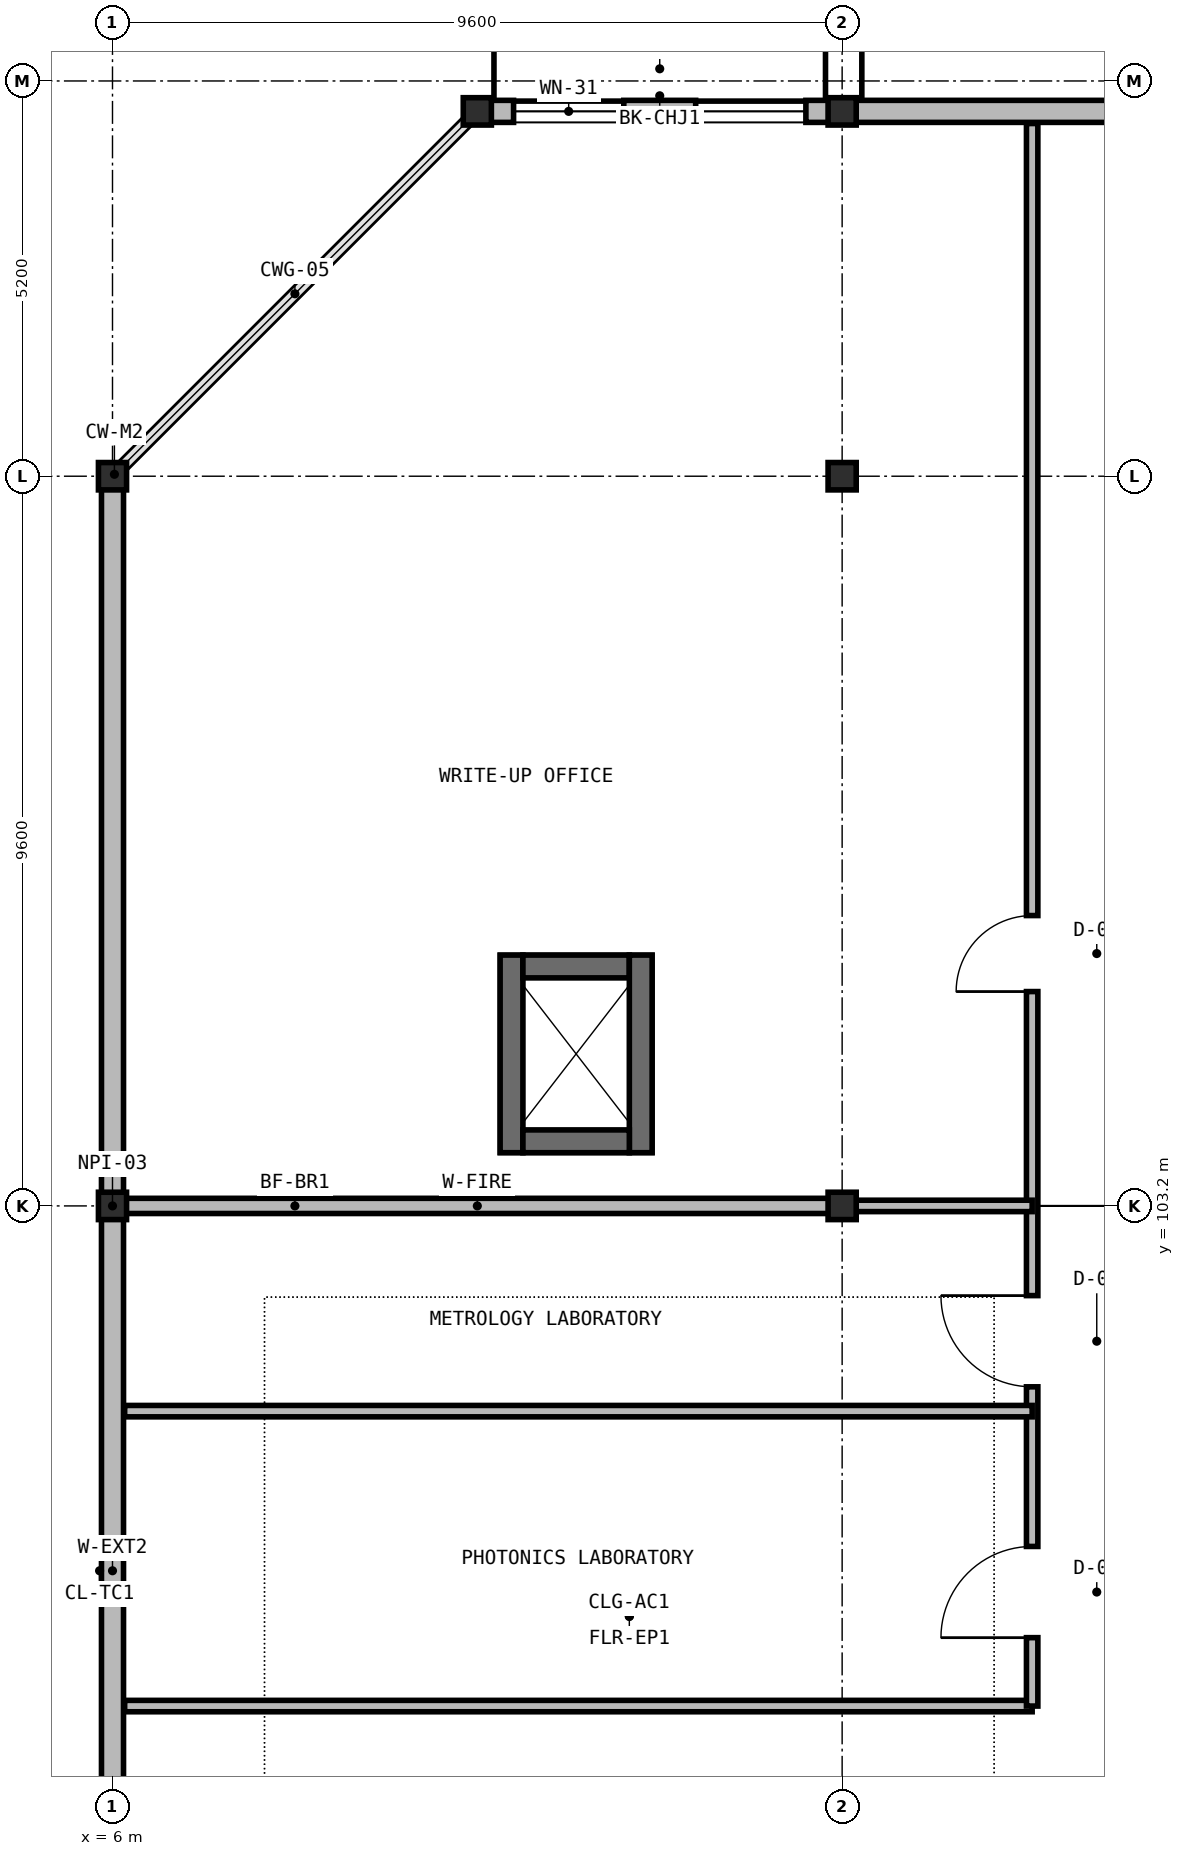
"""IFC4 building model, lengths in metres.
Left out: names, types, materials, properties, quantities, classifications, styles, units other than length and angle.
Written with IfcOpenShell. Run it as: python <this file> out.ifc"""

import sys

from ifc_helpers import new_model, si_unit, direction, frame, frame_2d, origin, origin_2d, place, context, subcontext, project, spatial, rectangle, i_section, extrude, element, fill, save


model = new_model("IFC4")
c1 = context("Model", 3, precision=1e-05, world=origin(), true_north=direction((0.0, 1.0)))
c2 = subcontext(c1, "Body", "Model", "MODEL_VIEW")
j1 = project(units=[si_unit("LENGTHUNIT", "METRE"), si_unit("PLANEANGLEUNIT", "RADIAN")], contexts=[c1])
p1 = place(None, origin())
s1 = spatial("IfcSite", under=j1, at=p1, CompositionType="ELEMENT")
p2 = place(p1, origin())
s2 = spatial("IfcBuilding", under=s1, at=p2, CompositionType="ELEMENT")
p3 = place(p2, frame((0.0, 0.0, 14.35)))
s3 = spatial("IfcBuildingStorey", under=s2, at=p3, CompositionType="ELEMENT", Elevation=14.35)
for number, where, z_axis, x_axis in (
    (1, (6.0, 103.2, 0.0), (0.0, 0.0, 1.0), (1.0, 0.0, 0.0)),
    (2, (6.0, 112.8, 0.0), (0.0, 0.0, 1.0), (1.0, 0.0, 0.0)),
    (3, (15.6, 103.2, 0.0), (0.0, 0.0, 1.0), (1.0, 0.0, 0.0)),
    (4, (15.6, 112.8, 0.0), (0.0, 0.0, 1.0), (1.0, 0.0, 0.0)),
    (5, (15.6, 117.6, 0.0), (0.0, 0.0, 1.0), (1.0, 0.0, 0.0)),
    (6, (10.8, 117.6, 0.0), (0.0, 0.0, 1.0), (1.0, 0.0, 0.0)),
):
    element("IfcColumn", number, at=place(p3, frame(where, z_axis=z_axis, x_axis=x_axis)), inside=s3, PredefinedType="COLUMN", context=c2, shape_type="SweptSolid", body=[
        extrude(i_section(OverallWidth=0.37, OverallDepth=0.36, WebThickness=0.014, FlangeThickness=0.022, at=origin_2d()), origin(), (0.0, 0.0, 1.0), 4.55),
    ])
p4 = place(p3, frame((11.25, 103.9, 0.0), z_axis=(0.0, 0.0, 1.0), x_axis=(0.0, 1.0, 0.0)))
e7 = element("IfcWall", 7, at=p4, inside=s3, PredefinedType="SHEAR", context=c2, shape_type="SweptSolid", body=[
    extrude(rectangle(XDim=2.6, YDim=0.3, at=frame_2d((1.3, 0.0))), origin(), (0.0, 0.0, 1.0), 4.37),
])
p5 = place(p3, frame((11.4, 106.35, 0.0), z_axis=(0.0, 0.0, 1.0), x_axis=(1.0, 0.0, 0.0)))
e8 = element("IfcWall", 8, at=p5, inside=s3, PredefinedType="SHEAR", context=c2, shape_type="SweptSolid", body=[
    extrude(rectangle(XDim=1.4, YDim=0.3, at=frame_2d((0.7, 0.0))), origin(), (0.0, 0.0, 1.0), 4.37),
])
p6 = place(p3, frame((12.95, 106.5, 0.0), z_axis=(0.0, 0.0, 1.0), x_axis=(0.0, -1.0, 0.0)))
e9 = element("IfcWall", 9, at=p6, inside=s3, PredefinedType="SHEAR", context=c2, shape_type="SweptSolid", body=[
    extrude(rectangle(XDim=2.6, YDim=0.3, at=frame_2d((1.3, 0.0))), origin(), (0.0, 0.0, 1.0), 4.37),
])
p7 = place(p3, frame((12.8, 104.05, 0.0), z_axis=(0.0, 0.0, 1.0), x_axis=(-1.0, 0.0, 0.0)))
e10 = element("IfcWall", 10, at=p7, inside=s3, PredefinedType="SHEAR", context=c2, shape_type="SweptSolid", body=[
    extrude(rectangle(XDim=1.4, YDim=0.3, at=frame_2d((0.7, 0.0))), origin(), (0.0, 0.0, 1.0), 4.37),
])
p8 = place(p3, frame((6.0, 93.604, 0.0), z_axis=(0.0, 0.0, 1.0), x_axis=(0.0, 1.0, 0.0)))
e11 = element("IfcWall", 11, at=p8, inside=s3, PredefinedType="SOLIDWALL", context=c2, shape_type="SweptSolid", body=[
    extrude(rectangle(XDim=9.592, YDim=0.29, at=frame_2d((4.796, 0.0))), origin(), (0.0, 0.0, 1.0), 3.884),
])
p9 = place(p3, frame((6.0, 103.204, 0.0), z_axis=(0.0, 0.0, 1.0), x_axis=(0.0, 1.0, 0.0)))
e12 = element("IfcWall", 12, at=p9, inside=s3, PredefinedType="SOLIDWALL", context=c2, shape_type="SweptSolid", body=[
    extrude(rectangle(XDim=9.592, YDim=0.29, at=frame_2d((4.796, 0.0))), origin(), (0.0, 0.0, 1.0), 3.884),
])
p10 = place(p3, frame((10.804, 117.6, 0.0), z_axis=(0.0, 0.0, 1.0), x_axis=(1.0, 0.0, 0.0)))
e13 = element("IfcWall", 13, at=p10, inside=s3, PredefinedType="SOLIDWALL", context=c2, shape_type="SweptSolid", body=[
    extrude(rectangle(XDim=4.792, YDim=0.29, at=frame_2d((2.396, 0.0))), origin(), (0.0, 0.0, 1.0), 4.37),
])
p11 = place(p10, frame((0.473, 0.0, 0.95)))
e14 = element("IfcOpeningElement", 14, at=p11, cuts=e13, PredefinedType="OPENING", context=c2, shape_type="SweptSolid", body=[
    extrude(rectangle(XDim=1.45, YDim=1.59, at=frame_2d((0.725, 0.795))), frame((0.0, 0.155, 0.0), z_axis=(0.0, -1.0, 0.0), x_axis=(1.0, 0.0, 0.0)), (0.0, 0.0, 1.0), 0.31),
])
p12 = place(p10, frame((2.869, 0.0, 0.95)))
e15 = element("IfcOpeningElement", 15, at=p12, cuts=e13, PredefinedType="OPENING", context=c2, shape_type="SweptSolid", body=[
    extrude(rectangle(XDim=1.45, YDim=1.59, at=frame_2d((0.725, 0.795))), frame((0.0, 0.155, 0.0), z_axis=(0.0, -1.0, 0.0), x_axis=(1.0, 0.0, 0.0)), (0.0, 0.0, 1.0), 0.31),
])
p13 = place(p3, frame((15.604, 117.6, 0.0), z_axis=(0.0, 0.0, 1.0), x_axis=(1.0, 0.0, 0.0)))
e16 = element("IfcWall", 16, at=p13, inside=s3, PredefinedType="SOLIDWALL", context=c2, shape_type="SweptSolid", body=[
    extrude(rectangle(XDim=9.592, YDim=0.29, at=frame_2d((4.796, 0.0))), origin(), (0.0, 0.0, 1.0), 3.884),
])
p14 = place(p13, frame((6.449, 0.0, 0.95)))
e17 = element("IfcOpeningElement", 17, at=p14, cuts=e16, PredefinedType="OPENING", context=c2, shape_type="SweptSolid", body=[
    extrude(rectangle(XDim=1.49, YDim=1.43, at=frame_2d((0.745, 0.715))), frame((0.0, 0.155, 0.0), z_axis=(0.0, -1.0, 0.0), x_axis=(1.0, 0.0, 0.0)), (0.0, 0.0, 1.0), 0.31),
])
p15 = place(p3, frame((6.16, 103.2, 0.0), z_axis=(0.0, 0.0, 1.0), x_axis=(1.0, 0.0, 0.0)))
e18 = element("IfcWall", 18, at=p15, inside=s3, PredefinedType="SOLIDWALL", context=c2, shape_type="SweptSolid", body=[
    extrude(rectangle(XDim=9.28, YDim=0.2, at=frame_2d((4.64, 0.0))), origin(), (0.0, 0.0, 1.0), 3.815),
])
p16 = place(p3, frame((6.16, 96.62, 0.0), z_axis=(0.0, 0.0, 1.0), x_axis=(1.0, 0.0, 0.0)))
e19 = element("IfcWall", 19, at=p16, inside=s3, PredefinedType="PARTITIONING", context=c2, shape_type="SweptSolid", body=[
    extrude(rectangle(XDim=11.94, YDim=0.15, at=frame_2d((5.97, 0.0))), origin(), (0.0, 0.0, 1.0), 4.3),
])
p17 = place(p3, frame((18.1, 96.62, 0.0), z_axis=(0.0, 0.0, 1.0), x_axis=(0.0, 1.0, 0.0)))
e20 = element("IfcWall", 20, at=p17, inside=s3, PredefinedType="PARTITIONING", context=c2, shape_type="SweptSolid", body=[
    extrude(rectangle(XDim=20.82, YDim=0.15, at=frame_2d((10.41, 0.0))), origin(), (0.0, 0.0, 1.0), 4.3),
])
p18 = place(p17, frame((0.9, 0.0, 0.0)))
e21 = element("IfcOpeningElement", 21, at=p18, cuts=e20, PredefinedType="OPENING", context=c2, shape_type="SweptSolid", body=[
    extrude(rectangle(XDim=1.2, YDim=2.2, at=frame_2d((0.6, 1.1))), frame((0.0, 0.085, 0.0), z_axis=(0.0, -1.0, 0.0), x_axis=(1.0, 0.0, 0.0)), (0.0, 0.0, 1.0), 0.17),
])
p19 = place(p17, frame((4.2, 0.0, 0.0)))
e22 = element("IfcOpeningElement", 22, at=p19, cuts=e20, PredefinedType="OPENING", context=c2, shape_type="SweptSolid", body=[
    extrude(rectangle(XDim=1.2, YDim=2.2, at=frame_2d((0.6, 1.1))), frame((0.0, 0.085, 0.0), z_axis=(0.0, -1.0, 0.0), x_axis=(1.0, 0.0, 0.0)), (0.0, 0.0, 1.0), 0.17),
])
p20 = place(p17, frame((9.4, 0.0, 0.0)))
e23 = element("IfcOpeningElement", 23, at=p20, cuts=e20, PredefinedType="OPENING", context=c2, shape_type="SweptSolid", body=[
    extrude(rectangle(XDim=1.0, YDim=2.2, at=frame_2d((0.5, 1.1))), frame((0.0, 0.085, 0.0), z_axis=(0.0, -1.0, 0.0), x_axis=(1.0, 0.0, 0.0)), (0.0, 0.0, 1.0), 0.17),
])
p21 = place(p3, frame((6.16, 100.5, 0.0), z_axis=(0.0, 0.0, 1.0), x_axis=(1.0, 0.0, 0.0)))
e24 = element("IfcWall", 24, at=p21, inside=s3, PredefinedType="PARTITIONING", context=c2, shape_type="SweptSolid", body=[
    extrude(rectangle(XDim=11.94, YDim=0.15, at=frame_2d((5.97, 0.0))), origin(), (0.0, 0.0, 1.0), 4.3),
])
p22 = place(p3, frame((15.55, 103.2, 0.0), z_axis=(0.0, 0.0, 1.0), x_axis=(1.0, 0.0, 0.0)))
e25 = element("IfcWall", 25, at=p22, inside=s3, PredefinedType="PARTITIONING", context=c2, shape_type="SweptSolid", body=[
    extrude(rectangle(XDim=2.55, YDim=0.15, at=frame_2d((1.275, 0.0))), origin(), (0.0, 0.0, 1.0), 3.815),
])
p23 = place(p11, origin())
e26 = element("IfcWindow", 26, at=p23, inside=s3, PartitioningType="SINGLE_PANEL", PredefinedType="WINDOW", context=c2, shape_type="SweptSolid", body=[
    extrude(rectangle(XDim=1.45, YDim=1.59, at=frame_2d((0.725, 0.795))), frame((0.0, 0.03, 0.0), z_axis=(0.0, -1.0, 0.0), x_axis=(1.0, 0.0, 0.0)), (0.0, 0.0, 1.0), 0.06),
])
fill(e14, e26)
p24 = place(p12, origin())
e27 = element("IfcWindow", 27, at=p24, inside=s3, PartitioningType="SINGLE_PANEL", PredefinedType="WINDOW", context=c2, shape_type="SweptSolid", body=[
    extrude(rectangle(XDim=1.45, YDim=1.59, at=frame_2d((0.725, 0.795))), frame((0.0, 0.03, 0.0), z_axis=(0.0, -1.0, 0.0), x_axis=(1.0, 0.0, 0.0)), (0.0, 0.0, 1.0), 0.06),
])
fill(e15, e27)
p25 = place(p18, origin())
e28 = element("IfcDoor", 28, at=p25, inside=s3, OperationType="SINGLE_SWING_LEFT", PredefinedType="DOOR", context=c2, shape_type="SweptSolid", body=[
    extrude(rectangle(XDim=1.2, YDim=2.2, at=frame_2d((0.6, 1.1))), frame((0.0, 0.025, 0.0), z_axis=(0.0, -1.0, 0.0), x_axis=(1.0, 0.0, 0.0)), (0.0, 0.0, 1.0), 0.05),
])
fill(e21, e28)
p26 = place(p19, origin())
e29 = element("IfcDoor", 29, at=p26, inside=s3, OperationType="SINGLE_SWING_RIGHT", PredefinedType="DOOR", context=c2, shape_type="SweptSolid", body=[
    extrude(rectangle(XDim=1.2, YDim=2.2, at=frame_2d((0.6, 1.1))), frame((0.0, 0.025, 0.0), z_axis=(0.0, -1.0, 0.0), x_axis=(1.0, 0.0, 0.0)), (0.0, 0.0, 1.0), 0.05),
])
fill(e22, e29)
p27 = place(p20, origin())
e30 = element("IfcDoor", 30, at=p27, inside=s3, OperationType="SINGLE_SWING_LEFT", PredefinedType="DOOR", context=c2, shape_type="SweptSolid", body=[
    extrude(rectangle(XDim=1.0, YDim=2.2, at=frame_2d((0.5, 1.1))), frame((0.0, 0.025, 0.0), z_axis=(0.0, -1.0, 0.0), x_axis=(1.0, 0.0, 0.0)), (0.0, 0.0, 1.0), 0.05),
])
fill(e23, e30)
save(model, sys.argv[1])
